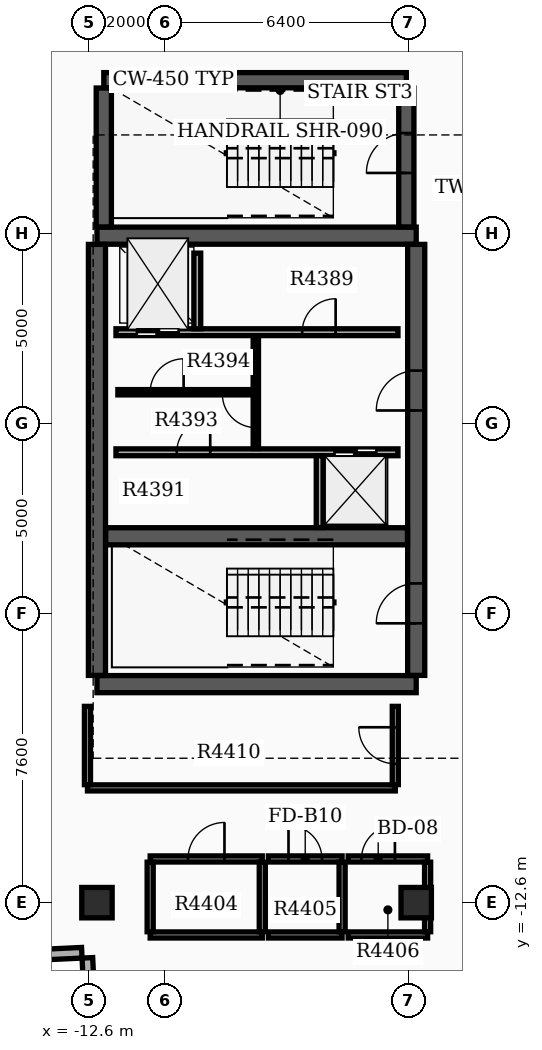
"""IFC4 building model, lengths in metres.
Left out: names, types, materials, properties, quantities, classifications, styles, units other than length and angle.
Written with IfcOpenShell. Run it as: python <this file> out.ifc"""

import sys

from ifc_helpers import new_model, si_unit, direction, frame, frame_2d, origin, origin_2d, place, context, subcontext, project, spatial, rectangle, extrude, element, fill, save


model = new_model("IFC4")
c1 = context("Model", 3, precision=1e-05, world=origin(), true_north=direction((0.0, 1.0)))
c2 = subcontext(c1, "Body", "Model", "MODEL_VIEW")
j1 = project(units=[si_unit("LENGTHUNIT", "METRE"), si_unit("PLANEANGLEUNIT", "RADIAN")], contexts=[c1])
p1 = place(None, origin())
s1 = spatial("IfcSite", under=j1, at=p1, CompositionType="ELEMENT")
p2 = place(p1, origin())
s2 = spatial("IfcBuilding", under=s1, at=p2, CompositionType="ELEMENT")
p3 = place(p2, frame((0.0, 0.0, 277.2)))
s3 = spatial("IfcBuildingStorey", under=s2, at=p3, CompositionType="ELEMENT", Elevation=277.2)
for number, where, z_axis, x_axis in (
    (1, (-12.4, -6.85, 0.0), (0.0, 0.0, 1.0), (1.0, 0.0, 0.0)),
    (2, (-12.4, 4.95, 0.0), (0.0, 0.0, 1.0), (1.0, 0.0, 0.0)),
):
    element("IfcWall", number, at=place(p3, frame(where, z_axis=z_axis, x_axis=x_axis)), inside=s3, PredefinedType="SHEAR", context=c2, shape_type="SweptSolid", body=[
        extrude(rectangle(XDim=8.4, YDim=0.45, at=frame_2d((4.2, 0.0))), origin(), (0.0, 0.0, 1.0), 3.7),
    ])
p4 = place(p3, frame((-12.4, -6.62, 0.0), z_axis=(0.0, 0.0, 1.0), x_axis=(0.0, 1.0, 0.0)))
e3 = element("IfcWall", 3, at=p4, inside=s3, PredefinedType="SHEAR", context=c2, shape_type="SweptSolid", body=[
    extrude(rectangle(XDim=11.34, YDim=0.45, at=frame_2d((5.67, 0.0))), origin(), (0.0, 0.0, 1.0), 3.7),
])
p5 = place(p3, frame((-4.0, -6.62, 0.0), z_axis=(0.0, 0.0, 1.0), x_axis=(0.0, 1.0, 0.0)))
e4 = element("IfcWall", 4, at=p5, inside=s3, PredefinedType="SHEAR", context=c2, shape_type="SweptSolid", body=[
    extrude(rectangle(XDim=11.34, YDim=0.45, at=frame_2d((5.67, 0.0))), origin(), (0.0, 0.0, 1.0), 3.7),
])
p6 = place(p5, frame((1.37, 0.0, 0.0)))
e5 = element("IfcOpeningElement", 5, at=p6, cuts=e4, PredefinedType="OPENING", context=c2, shape_type="SweptSolid", body=[
    extrude(rectangle(XDim=1.05, YDim=2.15, at=frame_2d((0.525, 1.075))), frame((0.0, 0.235, 0.0), z_axis=(0.0, -1.0, 0.0), x_axis=(1.0, 0.0, 0.0)), (0.0, 0.0, 1.0), 0.47),
])
p7 = place(p5, frame((6.97, 0.0, 0.0)))
e6 = element("IfcOpeningElement", 6, at=p7, cuts=e4, PredefinedType="OPENING", context=c2, shape_type="SweptSolid", body=[
    extrude(rectangle(XDim=1.05, YDim=2.15, at=frame_2d((0.525, 1.075))), frame((0.0, 0.235, 0.0), z_axis=(0.0, -1.0, 0.0), x_axis=(1.0, 0.0, 0.0)), (0.0, 0.0, 1.0), 0.47),
])
p8 = place(p3, frame((-12.17, -2.96, 0.0), z_axis=(0.0, 0.0, 1.0), x_axis=(1.0, 0.0, 0.0)))
e7 = element("IfcWall", 7, at=p8, inside=s3, PredefinedType="SHEAR", context=c2, shape_type="SweptSolid", body=[
    extrude(rectangle(XDim=7.94, YDim=0.45, at=frame_2d((3.97, 0.0))), origin(), (0.0, 0.0, 1.0), 3.7),
])
p9 = place(p3, frame((-12.22, 9.04, 0.0), z_axis=(0.0, 0.0, 1.0), x_axis=(1.0, 0.0, 0.0)))
e8 = element("IfcWall", 8, at=p9, inside=s3, PredefinedType="SHEAR", context=c2, shape_type="SweptSolid", body=[
    extrude(rectangle(XDim=7.96, YDim=0.4, at=frame_2d((3.98, 0.0))), origin(), (0.0, 0.0, 1.0), 3.7),
])
p10 = place(p3, frame((-12.22, 5.18, 0.0), z_axis=(0.0, 0.0, 1.0), x_axis=(0.0, 1.0, 0.0)))
e9 = element("IfcWall", 9, at=p10, inside=s3, PredefinedType="SHEAR", context=c2, shape_type="SweptSolid", body=[
    extrude(rectangle(XDim=3.655, YDim=0.4, at=frame_2d((1.828, 0.0))), origin(), (0.0, 0.0, 1.0), 3.7),
])
p11 = place(p3, frame((-4.26, 5.18, 0.0), z_axis=(0.0, 0.0, 1.0), x_axis=(0.0, 1.0, 0.0)))
e10 = element("IfcWall", 10, at=p11, inside=s3, PredefinedType="SHEAR", context=c2, shape_type="SweptSolid", body=[
    extrude(rectangle(XDim=3.655, YDim=0.4, at=frame_2d((1.828, 0.0))), origin(), (0.0, 0.0, 1.0), 3.7),
])
p12 = place(p11, frame((1.42, 0.0, 0.0)))
e11 = element("IfcOpeningElement", 11, at=p12, cuts=e10, PredefinedType="OPENING", context=c2, shape_type="SweptSolid", body=[
    extrude(rectangle(XDim=1.05, YDim=2.15, at=frame_2d((0.525, 1.075))), frame((0.0, 0.21, 0.0), z_axis=(0.0, -1.0, 0.0), x_axis=(1.0, 0.0, 0.0)), (0.0, 0.0, 1.0), 0.42),
])
for number, where, z_axis, x_axis in (
    (12, (-12.4, -12.6, 0.0), (0.0, 0.0, 1.0), (1.0, 0.0, 0.0)),
    (13, (-4.0, -12.6, 0.0), (0.0, 0.0, 1.0), (1.0, 0.0, 0.0)),
):
    element("IfcColumn", number, at=place(p3, frame(where, z_axis=z_axis, x_axis=x_axis)), inside=s3, PredefinedType="COLUMN", context=c2, shape_type="SweptSolid", body=[
        extrude(rectangle(XDim=0.8, YDim=0.8, at=origin_2d()), origin(), (0.0, 0.0, 1.0), 3.9),
    ])
p13 = place(p3, frame((-14.017, -13.976, 0.0), z_axis=(0.0, 0.0, 1.0), x_axis=(0.998883930236, 0.047232339719, 0.0)))
e14 = element("IfcWall", 14, at=p13, inside=s3, PredefinedType="STANDARD", context=c2, shape_type="SweptSolid", body=[
    extrude(rectangle(XDim=1.22, YDim=0.28, at=frame_2d((0.61, 0.0))), origin(), (0.0, 0.0, 1.0), 3.18),
])
p14 = place(p3, frame((-12.652, -14.052, 0.0), z_axis=(0.0, 0.0, 1.0), x_axis=(0.047039284441, -0.99889304018, 0.0)))
e15 = element("IfcWall", 15, at=p14, inside=s3, PredefinedType="STANDARD", context=c2, shape_type="SweptSolid", body=[
    extrude(rectangle(XDim=1.5, YDim=0.28, at=frame_2d((0.75, 0.0))), origin(), (0.0, 0.0, 1.0), 3.18),
])
p15 = place(p3, frame((-11.9, 2.41, 0.0), z_axis=(0.0, 0.0, 1.0), x_axis=(1.0, 0.0, 0.0)))
e16 = element("IfcWall", 16, at=p15, inside=s3, PredefinedType="SOLIDWALL", context=c2, shape_type="SweptSolid", body=[
    extrude(rectangle(XDim=7.42, YDim=0.18, at=frame_2d((3.71, 0.0))), origin(), (0.0, 0.0, 1.0), 3.17),
])
p16 = place(p15, frame((0.55, 0.0, 0.0)))
e17 = element("IfcOpeningElement", 17, at=p16, cuts=e16, PredefinedType="OPENING", context=c2, shape_type="SweptSolid", body=[
    extrude(rectangle(XDim=1.1, YDim=2.15, at=frame_2d((0.55, 1.075))), frame((0.0, 0.1, 0.0), z_axis=(0.0, -1.0, 0.0), x_axis=(1.0, 0.0, 0.0)), (0.0, 0.0, 1.0), 0.2),
])
p17 = place(p15, frame((4.9, 0.0, 0.0)))
e18 = element("IfcOpeningElement", 18, at=p17, cuts=e16, PredefinedType="OPENING", context=c2, shape_type="SweptSolid", body=[
    extrude(rectangle(XDim=0.88, YDim=2.1, at=frame_2d((0.44, 1.05))), frame((0.0, 0.1, 0.0), z_axis=(0.0, -1.0, 0.0), x_axis=(1.0, 0.0, 0.0)), (0.0, 0.0, 1.0), 0.2),
])
p18 = place(p3, frame((-11.9, -0.75, 0.0), z_axis=(0.0, 0.0, 1.0), x_axis=(1.0, 0.0, 0.0)))
e19 = element("IfcWall", 19, at=p18, inside=s3, PredefinedType="SOLIDWALL", context=c2, shape_type="SweptSolid", body=[
    extrude(rectangle(XDim=7.42, YDim=0.18, at=frame_2d((3.71, 0.0))), origin(), (0.0, 0.0, 1.0), 3.17),
])
p19 = place(p18, frame((5.75, 0.0, 0.0)))
e20 = element("IfcOpeningElement", 20, at=p19, cuts=e19, PredefinedType="OPENING", context=c2, shape_type="SweptSolid", body=[
    extrude(rectangle(XDim=1.1, YDim=2.15, at=frame_2d((0.55, 1.075))), frame((0.0, 0.1, 0.0), z_axis=(0.0, -1.0, 0.0), x_axis=(1.0, 0.0, 0.0)), (0.0, 0.0, 1.0), 0.2),
])
p20 = place(p18, frame((1.6, 0.0, 0.0)))
e21 = element("IfcOpeningElement", 21, at=p20, cuts=e19, PredefinedType="OPENING", context=c2, shape_type="SweptSolid", body=[
    extrude(rectangle(XDim=0.88, YDim=2.1, at=frame_2d((0.44, 1.05))), frame((0.0, 0.1, 0.0), z_axis=(0.0, -1.0, 0.0), x_axis=(1.0, 0.0, 0.0)), (0.0, 0.0, 1.0), 0.2),
])
p21 = place(p3, frame((-9.76, 2.5, 0.0), z_axis=(0.0, 0.0, 1.0), x_axis=(0.0, 1.0, 0.0)))
e22 = element("IfcWall", 22, at=p21, inside=s3, PredefinedType="SOLIDWALL", context=c2, shape_type="SweptSolid", body=[
    extrude(rectangle(XDim=1.99, YDim=0.18, at=frame_2d((0.995, 0.0))), origin(), (0.0, 0.0, 1.0), 3.17),
])
p22 = place(p3, frame((-6.54, -2.73, 0.0), z_axis=(0.0, 0.0, 1.0), x_axis=(0.0, 1.0, 0.0)))
e23 = element("IfcWall", 23, at=p22, inside=s3, PredefinedType="SOLIDWALL", context=c2, shape_type="SweptSolid", body=[
    extrude(rectangle(XDim=1.89, YDim=0.18, at=frame_2d((0.945, 0.0))), origin(), (0.0, 0.0, 1.0), 3.17),
])
p23 = place(p3, frame((-8.22, -0.65, 0.0), z_axis=(0.0, 0.0, 1.0), x_axis=(0.0, 1.0, 0.0)))
e24 = element("IfcWall", 24, at=p23, inside=s3, PredefinedType="SOLIDWALL", context=c2, shape_type="SweptSolid", body=[
    extrude(rectangle(XDim=2.96, YDim=0.14, at=frame_2d((1.48, 0.0))), origin(), (0.0, 0.0, 1.0), 3.17),
])
p24 = place(p23, frame((0.55, 0.0, 0.0)))
e25 = element("IfcOpeningElement", 25, at=p24, cuts=e24, PredefinedType="OPENING", context=c2, shape_type="SweptSolid", body=[
    extrude(rectangle(XDim=0.88, YDim=2.1, at=frame_2d((0.44, 1.05))), frame((0.0, 0.08, 0.0), z_axis=(0.0, -1.0, 0.0), x_axis=(1.0, 0.0, 0.0)), (0.0, 0.0, 1.0), 0.16),
])
p25 = place(p3, frame((-11.85, 0.83, 0.0), z_axis=(0.0, 0.0, 1.0), x_axis=(1.0, 0.0, 0.0)))
e26 = element("IfcWall", 26, at=p25, inside=s3, PredefinedType="PARTITIONING", context=c2, shape_type="SweptSolid", body=[
    extrude(rectangle(XDim=3.552, YDim=0.14, at=frame_2d((1.776, 0.0))), origin(), (0.0, 0.0, 1.0), 3.17),
])
p26 = place(p25, frame((0.85, 0.0, 0.0)))
e27 = element("IfcOpeningElement", 27, at=p26, cuts=e26, PredefinedType="OPENING", context=c2, shape_type="SweptSolid", body=[
    extrude(rectangle(XDim=0.88, YDim=2.1, at=frame_2d((0.44, 1.05))), frame((0.0, 0.08, 0.0), z_axis=(0.0, -1.0, 0.0), x_axis=(1.0, 0.0, 0.0)), (0.0, 0.0, 1.0), 0.16),
])
p27 = place(p3, frame((-11.0, -13.45, 0.0), z_axis=(0.0, 0.0, 1.0), x_axis=(1.0, 0.0, 0.0)))
e28 = element("IfcWall", 28, at=p27, inside=s3, PredefinedType="PARTITIONING", context=c2, shape_type="SweptSolid", body=[
    extrude(rectangle(XDim=2.95, YDim=0.16, at=frame_2d((1.475, 0.0))), origin(), (0.0, 0.0, 1.0), 3.17),
])
p28 = place(p3, frame((-11.0, -11.45, 0.0), z_axis=(0.0, 0.0, 1.0), x_axis=(1.0, 0.0, 0.0)))
e29 = element("IfcWall", 29, at=p28, inside=s3, PredefinedType="PARTITIONING", context=c2, shape_type="SweptSolid", body=[
    extrude(rectangle(XDim=2.95, YDim=0.16, at=frame_2d((1.475, 0.0))), origin(), (0.0, 0.0, 1.0), 3.17),
])
p29 = place(p28, frame((0.995, 0.0, 0.0)))
e30 = element("IfcOpeningElement", 30, at=p29, cuts=e29, PredefinedType="OPENING", context=c2, shape_type="SweptSolid", body=[
    extrude(rectangle(XDim=0.96, YDim=2.15, at=frame_2d((0.48, 1.075))), frame((0.0, 0.09, 0.0), z_axis=(0.0, -1.0, 0.0), x_axis=(1.0, 0.0, 0.0)), (0.0, 0.0, 1.0), 0.18),
])
for number, where, z_axis, x_axis in (
    (31, (-11.0, -13.365, 0.0), (0.0, 0.0, 1.0), (0.0, 1.0, 0.0)),
    (32, (-8.05, -13.365, 0.0), (0.0, 0.0, 1.0), (0.0, 1.0, 0.0)),
):
    element("IfcWall", number, at=place(p3, frame(where, z_axis=z_axis, x_axis=x_axis)), inside=s3, PredefinedType="PARTITIONING", context=c2, shape_type="SweptSolid", body=[
        extrude(rectangle(XDim=1.83, YDim=0.16, at=frame_2d((0.915, 0.0))), origin(), (0.0, 0.0, 1.0), 3.17),
    ])
p30 = place(p3, frame((-7.89, -13.45, 0.0), z_axis=(0.0, 0.0, 1.0), x_axis=(1.0, 0.0, 0.0)))
e33 = element("IfcWall", 33, at=p30, inside=s3, PredefinedType="PARTITIONING", context=c2, shape_type="SweptSolid", body=[
    extrude(rectangle(XDim=1.94, YDim=0.16, at=frame_2d((0.97, 0.0))), origin(), (0.0, 0.0, 1.0), 3.17),
])
p31 = place(p3, frame((-7.89, -11.45, 0.0), z_axis=(0.0, 0.0, 1.0), x_axis=(1.0, 0.0, 0.0)))
e34 = element("IfcWall", 34, at=p31, inside=s3, PredefinedType="PARTITIONING", context=c2, shape_type="SweptSolid", body=[
    extrude(rectangle(XDim=1.94, YDim=0.16, at=frame_2d((0.97, 0.0))), origin(), (0.0, 0.0, 1.0), 3.17),
])
p32 = place(p31, frame((0.53, 0.0, 0.0)))
e35 = element("IfcOpeningElement", 35, at=p32, cuts=e34, PredefinedType="OPENING", context=c2, shape_type="SweptSolid", body=[
    extrude(rectangle(XDim=0.88, YDim=2.1, at=frame_2d((0.44, 1.05))), frame((0.0, 0.09, 0.0), z_axis=(0.0, -1.0, 0.0), x_axis=(1.0, 0.0, 0.0)), (0.0, 0.0, 1.0), 0.18),
])
p33 = place(p3, frame((-5.95, -13.365, 0.0), z_axis=(0.0, 0.0, 1.0), x_axis=(0.0, 1.0, 0.0)))
e36 = element("IfcWall", 36, at=p33, inside=s3, PredefinedType="PARTITIONING", context=c2, shape_type="SweptSolid", body=[
    extrude(rectangle(XDim=1.83, YDim=0.16, at=frame_2d((0.915, 0.0))), origin(), (0.0, 0.0, 1.0), 3.17),
])
p34 = place(p3, frame((-5.79, -13.45, 0.0), z_axis=(0.0, 0.0, 1.0), x_axis=(1.0, 0.0, 0.0)))
e37 = element("IfcWall", 37, at=p34, inside=s3, PredefinedType="PARTITIONING", context=c2, shape_type="SweptSolid", body=[
    extrude(rectangle(XDim=2.09, YDim=0.16, at=frame_2d((1.045, 0.0))), origin(), (0.0, 0.0, 1.0), 3.17),
])
p35 = place(p3, frame((-5.79, -11.45, 0.0), z_axis=(0.0, 0.0, 1.0), x_axis=(1.0, 0.0, 0.0)))
e38 = element("IfcWall", 38, at=p35, inside=s3, PredefinedType="PARTITIONING", context=c2, shape_type="SweptSolid", body=[
    extrude(rectangle(XDim=2.09, YDim=0.16, at=frame_2d((1.045, 0.0))), origin(), (0.0, 0.0, 1.0), 3.17),
])
p36 = place(p35, frame((0.35, 0.0, 0.0)))
e39 = element("IfcOpeningElement", 39, at=p36, cuts=e38, PredefinedType="OPENING", context=c2, shape_type="SweptSolid", body=[
    extrude(rectangle(XDim=0.88, YDim=2.15, at=frame_2d((0.44, 1.075))), frame((0.0, 0.09, 0.0), z_axis=(0.0, -1.0, 0.0), x_axis=(1.0, 0.0, 0.0)), (0.0, 0.0, 1.0), 0.18),
])
p37 = place(p3, frame((-3.7, -13.365, 0.0), z_axis=(0.0, 0.0, 1.0), x_axis=(0.0, 1.0, 0.0)))
e40 = element("IfcWall", 40, at=p37, inside=s3, PredefinedType="PARTITIONING", context=c2, shape_type="SweptSolid", body=[
    extrude(rectangle(XDim=1.83, YDim=0.16, at=frame_2d((0.915, 0.0))), origin(), (0.0, 0.0, 1.0), 3.17),
])
p38 = place(p3, frame((-12.65, -9.58, 0.0), z_axis=(0.0, 0.0, 1.0), x_axis=(1.0, 0.0, 0.0)))
e41 = element("IfcWall", 41, at=p38, inside=s3, PredefinedType="PARTITIONING", context=c2, shape_type="SweptSolid", body=[
    extrude(rectangle(XDim=8.1, YDim=0.16, at=frame_2d((4.05, 0.0))), origin(), (0.0, 0.0, 1.0), 3.17),
])
p39 = place(p3, frame((-12.65, -9.495, 0.0), z_axis=(0.0, 0.0, 1.0), x_axis=(0.0, 1.0, 0.0)))
e42 = element("IfcWall", 42, at=p39, inside=s3, PredefinedType="PARTITIONING", context=c2, shape_type="SweptSolid", body=[
    extrude(rectangle(XDim=2.06, YDim=0.16, at=frame_2d((1.03, 0.0))), origin(), (0.0, 0.0, 1.0), 3.17),
])
p40 = place(p3, frame((-4.55, -9.495, 0.0), z_axis=(0.0, 0.0, 1.0), x_axis=(0.0, 1.0, 0.0)))
e43 = element("IfcWall", 43, at=p40, inside=s3, PredefinedType="PARTITIONING", context=c2, shape_type="SweptSolid", body=[
    extrude(rectangle(XDim=2.06, YDim=0.16, at=frame_2d((1.03, 0.0))), origin(), (0.0, 0.0, 1.0), 3.17),
])
p41 = place(p40, frame((0.55, 0.0, 0.0)))
e44 = element("IfcOpeningElement", 44, at=p41, cuts=e43, PredefinedType="OPENING", context=c2, shape_type="SweptSolid", body=[
    extrude(rectangle(XDim=0.96, YDim=2.15, at=frame_2d((0.48, 1.075))), frame((0.0, 0.09, 0.0), z_axis=(0.0, -1.0, 0.0), x_axis=(1.0, 0.0, 0.0)), (0.0, 0.0, 1.0), 0.18),
])
p42 = place(p6, origin())
e45 = element("IfcDoor", 45, at=p42, inside=s3, OperationType="SINGLE_SWING_LEFT", PredefinedType="DOOR", context=c2, shape_type="SweptSolid", body=[
    extrude(rectangle(XDim=1.05, YDim=2.15, at=frame_2d((0.525, 1.075))), frame((0.0, 0.025, 0.0), z_axis=(0.0, -1.0, 0.0), x_axis=(1.0, 0.0, 0.0)), (0.0, 0.0, 1.0), 0.05),
])
fill(e5, e45)
p43 = place(p7, origin())
e46 = element("IfcDoor", 46, at=p43, inside=s3, OperationType="SINGLE_SWING_LEFT", PredefinedType="DOOR", context=c2, shape_type="SweptSolid", body=[
    extrude(rectangle(XDim=1.05, YDim=2.15, at=frame_2d((0.525, 1.075))), frame((0.0, 0.025, 0.0), z_axis=(0.0, -1.0, 0.0), x_axis=(1.0, 0.0, 0.0)), (0.0, 0.0, 1.0), 0.05),
])
fill(e6, e46)
p44 = place(p12, origin())
e47 = element("IfcDoor", 47, at=p44, inside=s3, OperationType="SINGLE_SWING_LEFT", PredefinedType="DOOR", context=c2, shape_type="SweptSolid", body=[
    extrude(rectangle(XDim=1.05, YDim=2.15, at=frame_2d((0.525, 1.075))), frame((0.0, 0.025, 0.0), z_axis=(0.0, -1.0, 0.0), x_axis=(1.0, 0.0, 0.0)), (0.0, 0.0, 1.0), 0.05),
])
fill(e11, e47)
p45 = place(p16, origin())
e48 = element("IfcDoor", 48, at=p45, inside=s3, OperationType="DOUBLE_DOOR_SLIDING", PredefinedType="DOOR", context=c2, shape_type="SweptSolid", body=[
    extrude(rectangle(XDim=1.1, YDim=2.15, at=frame_2d((0.55, 1.075))), frame((0.0, 0.025, 0.0), z_axis=(0.0, -1.0, 0.0), x_axis=(1.0, 0.0, 0.0)), (0.0, 0.0, 1.0), 0.05),
])
fill(e17, e48)
p46 = place(p19, origin())
e49 = element("IfcDoor", 49, at=p46, inside=s3, OperationType="DOUBLE_DOOR_SLIDING", PredefinedType="DOOR", context=c2, shape_type="SweptSolid", body=[
    extrude(rectangle(XDim=1.1, YDim=2.15, at=frame_2d((0.55, 1.075))), frame((0.0, 0.025, 0.0), z_axis=(0.0, -1.0, 0.0), x_axis=(1.0, 0.0, 0.0)), (0.0, 0.0, 1.0), 0.05),
])
fill(e20, e49)
p47 = place(p17, origin())
e50 = element("IfcDoor", 50, at=p47, inside=s3, OperationType="SINGLE_SWING_RIGHT", PredefinedType="DOOR", context=c2, shape_type="SweptSolid", body=[
    extrude(rectangle(XDim=0.88, YDim=2.1, at=frame_2d((0.44, 1.05))), frame((0.0, 0.025, 0.0), z_axis=(0.0, -1.0, 0.0), x_axis=(1.0, 0.0, 0.0)), (0.0, 0.0, 1.0), 0.05),
])
fill(e18, e50)
p48 = place(p20, origin())
e51 = element("IfcDoor", 51, at=p48, inside=s3, OperationType="SINGLE_SWING_RIGHT", PredefinedType="DOOR", context=c2, shape_type="SweptSolid", body=[
    extrude(rectangle(XDim=0.88, YDim=2.1, at=frame_2d((0.44, 1.05))), frame((0.0, 0.025, 0.0), z_axis=(0.0, -1.0, 0.0), x_axis=(1.0, 0.0, 0.0)), (0.0, 0.0, 1.0), 0.05),
])
fill(e21, e51)
p49 = place(p24, origin())
e52 = element("IfcDoor", 52, at=p49, inside=s3, OperationType="SINGLE_SWING_RIGHT", PredefinedType="DOOR", context=c2, shape_type="SweptSolid", body=[
    extrude(rectangle(XDim=0.88, YDim=2.1, at=frame_2d((0.44, 1.05))), frame((0.0, 0.025, 0.0), z_axis=(0.0, -1.0, 0.0), x_axis=(1.0, 0.0, 0.0)), (0.0, 0.0, 1.0), 0.05),
])
fill(e25, e52)
p50 = place(p26, origin())
e53 = element("IfcDoor", 53, at=p50, inside=s3, OperationType="SINGLE_SWING_RIGHT", PredefinedType="DOOR", context=c2, shape_type="SweptSolid", body=[
    extrude(rectangle(XDim=0.88, YDim=2.1, at=frame_2d((0.44, 1.05))), frame((0.0, 0.025, 0.0), z_axis=(0.0, -1.0, 0.0), x_axis=(1.0, 0.0, 0.0)), (0.0, 0.0, 1.0), 0.05),
])
fill(e27, e53)
p51 = place(p29, origin())
e54 = element("IfcDoor", 54, at=p51, inside=s3, OperationType="SINGLE_SWING_RIGHT", PredefinedType="DOOR", context=c2, shape_type="SweptSolid", body=[
    extrude(rectangle(XDim=0.96, YDim=2.15, at=frame_2d((0.48, 1.075))), frame((0.0, 0.025, 0.0), z_axis=(0.0, -1.0, 0.0), x_axis=(1.0, 0.0, 0.0)), (0.0, 0.0, 1.0), 0.05),
])
fill(e30, e54)
p52 = place(p32, origin())
e55 = element("IfcDoor", 55, at=p52, inside=s3, OperationType="SINGLE_SWING_LEFT", PredefinedType="DOOR", context=c2, shape_type="SweptSolid", body=[
    extrude(rectangle(XDim=0.88, YDim=2.1, at=frame_2d((0.44, 1.05))), frame((0.0, 0.025, 0.0), z_axis=(0.0, -1.0, 0.0), x_axis=(1.0, 0.0, 0.0)), (0.0, 0.0, 1.0), 0.05),
])
fill(e35, e55)
p53 = place(p36, origin())
e56 = element("IfcDoor", 56, at=p53, inside=s3, OperationType="SINGLE_SWING_RIGHT", PredefinedType="DOOR", context=c2, shape_type="SweptSolid", body=[
    extrude(rectangle(XDim=0.88, YDim=2.15, at=frame_2d((0.44, 1.075))), frame((0.0, 0.025, 0.0), z_axis=(0.0, -1.0, 0.0), x_axis=(1.0, 0.0, 0.0)), (0.0, 0.0, 1.0), 0.05),
])
fill(e39, e56)
p54 = place(p41, origin())
e57 = element("IfcDoor", 57, at=p54, inside=s3, OperationType="SINGLE_SWING_RIGHT", PredefinedType="DOOR", context=c2, shape_type="SweptSolid", body=[
    extrude(rectangle(XDim=0.96, YDim=2.15, at=frame_2d((0.48, 1.075))), frame((0.0, 0.025, 0.0), z_axis=(0.0, -1.0, 0.0), x_axis=(1.0, 0.0, 0.0)), (0.0, 0.0, 1.0), 0.05),
])
fill(e44, e57)
save(model, sys.argv[1])
